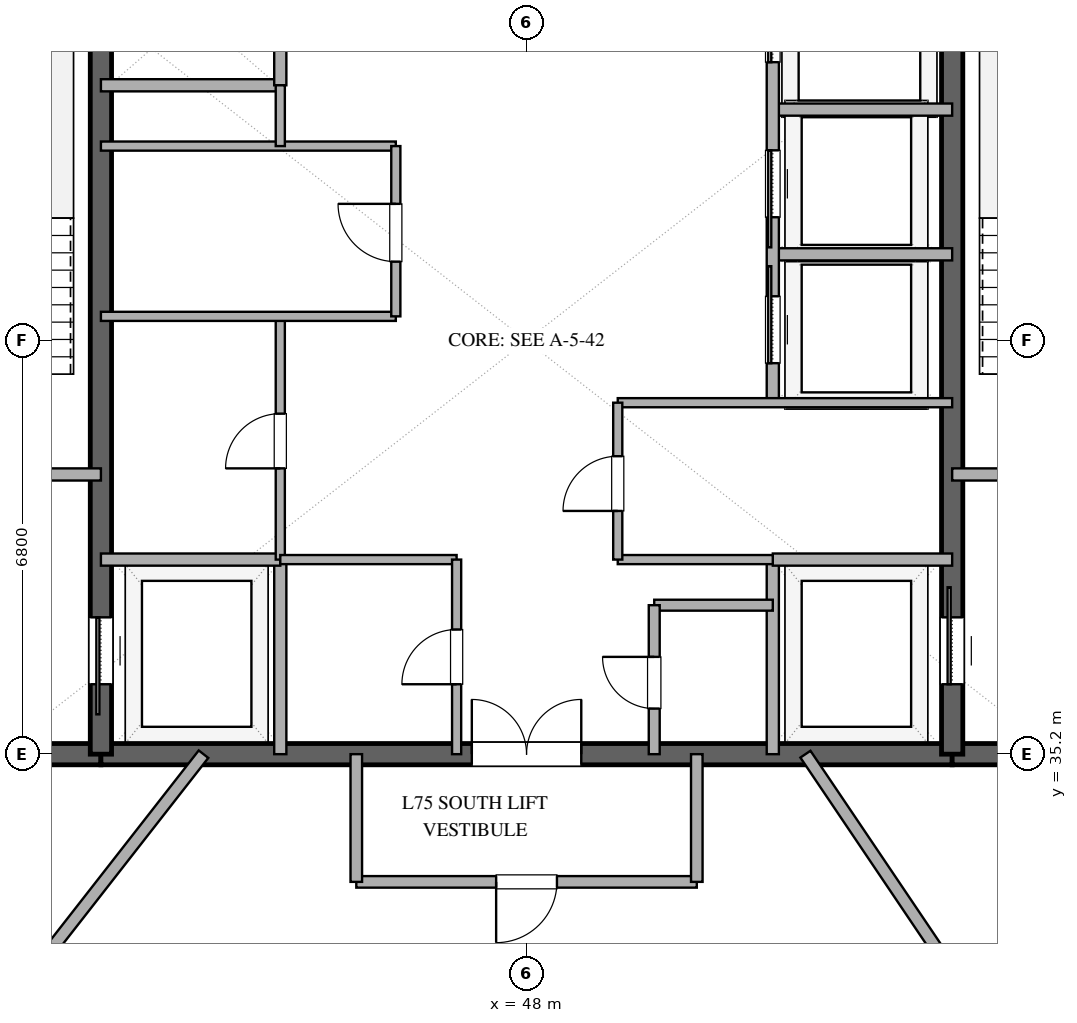
"""IFC4 building model, lengths in metres.
Left out: names, types, materials, properties, quantities, classifications, styles, units other than length and angle.
Written with IfcOpenShell. Run it as: python <this file> out.ifc"""

import sys

from ifc_helpers import new_model, si_unit, direction, frame, frame_2d, origin, place, context, subcontext, project, spatial, rectangle, extrude, element, fill, save


model = new_model("IFC4")
c1 = context("Model", 3, precision=1e-05, world=origin(), true_north=direction((0.0, 1.0)))
c2 = subcontext(c1, "Body", "Model", "MODEL_VIEW")
j1 = project(units=[si_unit("LENGTHUNIT", "METRE"), si_unit("PLANEANGLEUNIT", "RADIAN")], contexts=[c1])
p1 = place(None, origin())
s1 = spatial("IfcSite", under=j1, at=p1, CompositionType="ELEMENT")
p2 = place(p1, origin())
s2 = spatial("IfcBuilding", under=s1, at=p2, CompositionType="ELEMENT")
p3 = place(p2, frame((0.0, 0.0, 291.0)))
s3 = spatial("IfcBuildingStorey", under=s2, at=p3, CompositionType="ELEMENT", Elevation=291.0)
p4 = place(p3, frame((37.0, 35.2, 0.0), z_axis=(0.0, 0.0, 1.0), x_axis=(1.0, 0.0, 0.0)))
e1 = element("IfcWall", 1, at=p4, inside=s3, PredefinedType="SHEAR", context=c2, shape_type="SweptSolid", body=[
    extrude(rectangle(XDim=4.0, YDim=0.35, at=frame_2d((2.0, 0.0))), origin(), (0.0, 0.0, 1.0), 3.37),
])
p5 = place(p3, frame((41.0, 35.2, 0.0), z_axis=(0.0, 0.0, 1.0), x_axis=(1.0, 0.0, 0.0)))
e2 = element("IfcWall", 2, at=p5, inside=s3, PredefinedType="SHEAR", context=c2, shape_type="SweptSolid", body=[
    extrude(rectangle(XDim=14.0, YDim=0.35, at=frame_2d((7.0, 0.0))), origin(), (0.0, 0.0, 1.0), 3.37),
])
p6 = place(p5, frame((6.1, 0.0, 0.0)))
e3 = element("IfcOpeningElement", 3, at=p6, cuts=e2, PredefinedType="OPENING", context=c2, shape_type="SweptSolid", body=[
    extrude(rectangle(XDim=1.8, YDim=2.25, at=frame_2d((0.9, 1.125))), frame((0.0, 0.185, 0.0), z_axis=(0.0, -1.0, 0.0), x_axis=(1.0, 0.0, 0.0)), (0.0, 0.0, 1.0), 0.37),
])
p7 = place(p3, frame((55.0, 35.2, 0.0), z_axis=(0.0, 0.0, 1.0), x_axis=(1.0, 0.0, 0.0)))
e4 = element("IfcWall", 4, at=p7, inside=s3, PredefinedType="SHEAR", context=c2, shape_type="SweptSolid", body=[
    extrude(rectangle(XDim=4.0, YDim=0.35, at=frame_2d((2.0, 0.0))), origin(), (0.0, 0.0, 1.0), 3.37),
])
p8 = place(p3, frame((41.0, 35.2, 0.0), z_axis=(0.0, 0.0, 1.0), x_axis=(0.0, 1.0, 0.0)))
e5 = element("IfcWall", 5, at=p8, inside=s3, PredefinedType="SHEAR", context=c2, shape_type="SweptSolid", body=[
    extrude(rectangle(XDim=13.6, YDim=0.35, at=frame_2d((6.8, 0.0))), origin(), (0.0, 0.0, 1.0), 3.37),
])
p9 = place(p8, frame((1.15, 0.0, 0.0)))
e6 = element("IfcOpeningElement", 6, at=p9, cuts=e5, PredefinedType="OPENING", context=c2, shape_type="SweptSolid", body=[
    extrude(rectangle(XDim=1.1, YDim=2.2, at=frame_2d((0.55, 1.1))), frame((0.0, 0.185, 0.0), z_axis=(0.0, -1.0, 0.0), x_axis=(1.0, 0.0, 0.0)), (0.0, 0.0, 1.0), 0.37),
])
p10 = place(p3, frame((55.0, 35.2, 0.0), z_axis=(0.0, 0.0, 1.0), x_axis=(0.0, 1.0, 0.0)))
e7 = element("IfcWall", 7, at=p10, inside=s3, PredefinedType="SHEAR", context=c2, shape_type="SweptSolid", body=[
    extrude(rectangle(XDim=13.6, YDim=0.35, at=frame_2d((6.8, 0.0))), origin(), (0.0, 0.0, 1.0), 3.37),
])
p11 = place(p10, frame((1.15, 0.0, 0.0)))
e8 = element("IfcOpeningElement", 8, at=p11, cuts=e7, PredefinedType="OPENING", context=c2, shape_type="SweptSolid", body=[
    extrude(rectangle(XDim=1.1, YDim=2.2, at=frame_2d((0.55, 1.1))), frame((0.0, 0.185, 0.0), z_axis=(0.0, -1.0, 0.0), x_axis=(1.0, 0.0, 0.0)), (0.0, 0.0, 1.0), 0.37),
])
p12 = place(p3, frame((37.0, 39.8, 0.0), z_axis=(0.0, 0.0, 1.0), x_axis=(1.0, 0.0, 0.0)))
e9 = element("IfcWall", 9, at=p12, inside=s3, PredefinedType="SOLIDWALL", context=c2, shape_type="SweptSolid", body=[
    extrude(rectangle(XDim=4.0, YDim=0.2, at=frame_2d((2.0, 0.0))), origin(), (0.0, 0.0, 1.0), 2.73),
])
p13 = place(p12, frame((1.45, 0.0, 0.0)))
e10 = element("IfcOpeningElement", 10, at=p13, cuts=e9, PredefinedType="OPENING", context=c2, shape_type="SweptSolid", body=[
    extrude(rectangle(XDim=1.1, YDim=2.15, at=frame_2d((0.55, 1.075))), frame((0.0, 0.11, 0.0), z_axis=(0.0, -1.0, 0.0), x_axis=(1.0, 0.0, 0.0)), (0.0, 0.0, 1.0), 0.22),
])
p14 = place(p3, frame((55.0, 39.8, 0.0), z_axis=(0.0, 0.0, 1.0), x_axis=(1.0, 0.0, 0.0)))
e11 = element("IfcWall", 11, at=p14, inside=s3, PredefinedType="SOLIDWALL", context=c2, shape_type="SweptSolid", body=[
    extrude(rectangle(XDim=4.0, YDim=0.2, at=frame_2d((2.0, 0.0))), origin(), (0.0, 0.0, 1.0), 2.73),
])
p15 = place(p14, frame((1.45, 0.0, 0.0)))
e12 = element("IfcOpeningElement", 12, at=p15, cuts=e11, PredefinedType="OPENING", context=c2, shape_type="SweptSolid", body=[
    extrude(rectangle(XDim=1.1, YDim=2.15, at=frame_2d((0.55, 1.075))), frame((0.0, 0.11, 0.0), z_axis=(0.0, -1.0, 0.0), x_axis=(1.0, 0.0, 0.0)), (0.0, 0.0, 1.0), 0.22),
])
p16 = place(p3, frame((43.95, 35.2, 0.0), z_axis=(0.0, 0.0, 1.0), x_axis=(0.0, 1.0, 0.0)))
e13 = element("IfcWall", 13, at=p16, inside=s3, PredefinedType="SOLIDWALL", context=c2, shape_type="SweptSolid", body=[
    extrude(rectangle(XDim=3.2, YDim=0.2, at=frame_2d((1.6, 0.0))), origin(), (0.0, 0.0, 1.0), 2.73),
])
p17 = place(p3, frame((41.0, 38.4, 0.0), z_axis=(0.0, 0.0, 1.0), x_axis=(1.0, 0.0, 0.0)))
e14 = element("IfcWall", 14, at=p17, inside=s3, PredefinedType="SOLIDWALL", context=c2, shape_type="SweptSolid", body=[
    extrude(rectangle(XDim=2.95, YDim=0.2, at=frame_2d((1.475, 0.0))), origin(), (0.0, 0.0, 1.0), 2.73),
])
p18 = place(p3, frame((52.05, 35.2, 0.0), z_axis=(0.0, 0.0, 1.0), x_axis=(0.0, 1.0, 0.0)))
e15 = element("IfcWall", 15, at=p18, inside=s3, PredefinedType="SOLIDWALL", context=c2, shape_type="SweptSolid", body=[
    extrude(rectangle(XDim=3.2, YDim=0.2, at=frame_2d((1.6, 0.0))), origin(), (0.0, 0.0, 1.0), 2.73),
])
for number, where, z_axis, x_axis in (
    (16, (52.05, 38.4, 0.0), (0.0, 0.0, 1.0), (1.0, 0.0, 0.0)),
    (17, (41.0, 46.2, 0.0), (0.0, 0.0, 1.0), (1.0, 0.0, 0.0)),
):
    element("IfcWall", number, at=place(p3, frame(where, z_axis=z_axis, x_axis=x_axis)), inside=s3, PredefinedType="SOLIDWALL", context=c2, shape_type="SweptSolid", body=[
        extrude(rectangle(XDim=2.95, YDim=0.2, at=frame_2d((1.475, 0.0))), origin(), (0.0, 0.0, 1.0), 2.73),
    ])
p19 = place(p3, frame((43.95, 46.2, 0.0), z_axis=(0.0, 0.0, 1.0), x_axis=(0.0, 1.0, 0.0)))
e18 = element("IfcWall", 18, at=p19, inside=s3, PredefinedType="SOLIDWALL", context=c2, shape_type="SweptSolid", body=[
    extrude(rectangle(XDim=2.6, YDim=0.2, at=frame_2d((1.3, 0.0))), origin(), (0.0, 0.0, 1.0), 2.73),
])
p20 = place(p19, frame((0.8, 0.0, 0.0)))
e19 = element("IfcOpeningElement", 19, at=p20, cuts=e18, PredefinedType="OPENING", context=c2, shape_type="SweptSolid", body=[
    extrude(rectangle(XDim=0.85, YDim=2.15, at=frame_2d((0.425, 1.075))), frame((0.0, 0.11, 0.0), z_axis=(0.0, -1.0, 0.0), x_axis=(1.0, 0.0, 0.0)), (0.0, 0.0, 1.0), 0.22),
])
p21 = place(p3, frame((43.95, 38.4, 0.0), z_axis=(0.0, 0.0, 1.0), x_axis=(0.0, 1.0, 0.0)))
e20 = element("IfcWall", 20, at=p21, inside=s3, PredefinedType="PARTITIONING", context=c2, shape_type="SweptSolid", body=[
    extrude(rectangle(XDim=4.0, YDim=0.15, at=frame_2d((2.0, 0.0))), origin(), (0.0, 0.0, 1.0), 2.73),
])
p22 = place(p21, frame((1.5, 0.0, 0.0)))
e21 = element("IfcOpeningElement", 21, at=p22, cuts=e20, PredefinedType="OPENING", context=c2, shape_type="SweptSolid", body=[
    extrude(rectangle(XDim=0.9, YDim=2.15, at=frame_2d((0.45, 1.075))), frame((0.0, 0.085, 0.0), z_axis=(0.0, -1.0, 0.0), x_axis=(1.0, 0.0, 0.0)), (0.0, 0.0, 1.0), 0.17),
])
for number, where, z_axis, x_axis in (
    (22, (41.0, 42.4, 0.0), (0.0, 0.0, 1.0), (1.0, 0.0, 0.0)),
    (23, (41.0, 45.2, 0.0), (0.0, 0.0, 1.0), (1.0, 0.0, 0.0)),
):
    element("IfcWall", number, at=place(p3, frame(where, z_axis=z_axis, x_axis=x_axis)), inside=s3, PredefinedType="PARTITIONING", context=c2, shape_type="SweptSolid", body=[
        extrude(rectangle(XDim=4.85, YDim=0.15, at=frame_2d((2.425, 0.0))), origin(), (0.0, 0.0, 1.0), 2.73),
    ])
p23 = place(p3, frame((43.95, 45.2, 0.0), z_axis=(0.0, 0.0, 1.0), x_axis=(0.0, 1.0, 0.0)))
e24 = element("IfcWall", 24, at=p23, inside=s3, PredefinedType="PARTITIONING", context=c2, shape_type="SweptSolid", body=[
    extrude(rectangle(XDim=1.0, YDim=0.15, at=frame_2d((0.5, 0.0))), origin(), (0.0, 0.0, 1.0), 2.73),
])
p24 = place(p3, frame((45.85, 42.4, 0.0), z_axis=(0.0, 0.0, 1.0), x_axis=(0.0, 1.0, 0.0)))
e25 = element("IfcWall", 25, at=p24, inside=s3, PredefinedType="PARTITIONING", context=c2, shape_type="SweptSolid", body=[
    extrude(rectangle(XDim=2.8, YDim=0.15, at=frame_2d((1.4, 0.0))), origin(), (0.0, 0.0, 1.0), 2.73),
])
p25 = place(p24, frame((0.9, 0.0, 0.0)))
e26 = element("IfcOpeningElement", 26, at=p25, cuts=e25, PredefinedType="OPENING", context=c2, shape_type="SweptSolid", body=[
    extrude(rectangle(XDim=0.95, YDim=2.15, at=frame_2d((0.475, 1.075))), frame((0.0, 0.085, 0.0), z_axis=(0.0, -1.0, 0.0), x_axis=(1.0, 0.0, 0.0)), (0.0, 0.0, 1.0), 0.17),
])
for number, where, z_axis, x_axis in (
    (27, (52.05, 43.42, 0.0), (0.0, 0.0, 1.0), (1.0, 0.0, 0.0)),
    (28, (52.05, 45.8, 0.0), (0.0, 0.0, 1.0), (1.0, 0.0, 0.0)),
):
    element("IfcWall", number, at=place(p3, frame(where, z_axis=z_axis, x_axis=x_axis)), inside=s3, PredefinedType="SOLIDWALL", context=c2, shape_type="SweptSolid", body=[
        extrude(rectangle(XDim=2.95, YDim=0.2, at=frame_2d((1.475, 0.0))), origin(), (0.0, 0.0, 1.0), 2.73),
    ])
p26 = place(p3, frame((52.05, 40.98, 0.0), z_axis=(0.0, 0.0, 1.0), x_axis=(0.0, 1.0, 0.0)))
e29 = element("IfcWall", 29, at=p26, inside=s3, PredefinedType="SOLIDWALL", context=c2, shape_type="SweptSolid", body=[
    extrude(rectangle(XDim=7.82, YDim=0.2, at=frame_2d((3.91, 0.0))), origin(), (0.0, 0.0, 1.0), 2.73),
])
p27 = place(p26, frame((0.65, 0.0, 0.0)))
e30 = element("IfcOpeningElement", 30, at=p27, cuts=e29, PredefinedType="OPENING", context=c2, shape_type="SweptSolid", body=[
    extrude(rectangle(XDim=1.1, YDim=2.2, at=frame_2d((0.55, 1.1))), frame((0.0, 0.11, 0.0), z_axis=(0.0, -1.0, 0.0), x_axis=(1.0, 0.0, 0.0)), (0.0, 0.0, 1.0), 0.22),
])
p28 = place(p26, frame((3.05, 0.0, 0.0)))
e31 = element("IfcOpeningElement", 31, at=p28, cuts=e29, PredefinedType="OPENING", context=c2, shape_type="SweptSolid", body=[
    extrude(rectangle(XDim=1.1, YDim=2.2, at=frame_2d((0.55, 1.1))), frame((0.0, 0.11, 0.0), z_axis=(0.0, -1.0, 0.0), x_axis=(1.0, 0.0, 0.0)), (0.0, 0.0, 1.0), 0.22),
])
p29 = place(p26, frame((5.6, 0.0, 0.0)))
e32 = element("IfcOpeningElement", 32, at=p29, cuts=e29, PredefinedType="OPENING", context=c2, shape_type="SweptSolid", body=[
    extrude(rectangle(XDim=1.2, YDim=2.2, at=frame_2d((0.6, 1.1))), frame((0.0, 0.11, 0.0), z_axis=(0.0, -1.0, 0.0), x_axis=(1.0, 0.0, 0.0)), (0.0, 0.0, 1.0), 0.22),
])
p30 = place(p3, frame((49.5, 40.98, 0.0), z_axis=(0.0, 0.0, 1.0), x_axis=(1.0, 0.0, 0.0)))
e33 = element("IfcWall", 33, at=p30, inside=s3, PredefinedType="PARTITIONING", context=c2, shape_type="SweptSolid", body=[
    extrude(rectangle(XDim=5.5, YDim=0.15, at=frame_2d((2.75, 0.0))), origin(), (0.0, 0.0, 1.0), 2.73),
])
p31 = place(p3, frame((49.5, 38.4, 0.0), z_axis=(0.0, 0.0, 1.0), x_axis=(1.0, 0.0, 0.0)))
e34 = element("IfcWall", 34, at=p31, inside=s3, PredefinedType="PARTITIONING", context=c2, shape_type="SweptSolid", body=[
    extrude(rectangle(XDim=2.55, YDim=0.15, at=frame_2d((1.275, 0.0))), origin(), (0.0, 0.0, 1.0), 2.73),
])
p32 = place(p3, frame((49.5, 38.4, 0.0), z_axis=(0.0, 0.0, 1.0), x_axis=(0.0, 1.0, 0.0)))
e35 = element("IfcWall", 35, at=p32, inside=s3, PredefinedType="PARTITIONING", context=c2, shape_type="SweptSolid", body=[
    extrude(rectangle(XDim=2.58, YDim=0.15, at=frame_2d((1.29, 0.0))), origin(), (0.0, 0.0, 1.0), 2.73),
])
p33 = place(p32, frame((0.8, 0.0, 0.0)))
e36 = element("IfcOpeningElement", 36, at=p33, cuts=e35, PredefinedType="OPENING", context=c2, shape_type="SweptSolid", body=[
    extrude(rectangle(XDim=0.9, YDim=2.15, at=frame_2d((0.45, 1.075))), frame((0.0, 0.085, 0.0), z_axis=(0.0, -1.0, 0.0), x_axis=(1.0, 0.0, 0.0)), (0.0, 0.0, 1.0), 0.17),
])
p34 = place(p3, frame((43.95, 38.4, 0.0), z_axis=(0.0, 0.0, 1.0), x_axis=(1.0, 0.0, 0.0)))
e37 = element("IfcWall", 37, at=p34, inside=s3, PredefinedType="PARTITIONING", context=c2, shape_type="SweptSolid", body=[
    extrude(rectangle(XDim=2.9, YDim=0.15, at=frame_2d((1.45, 0.0))), origin(), (0.0, 0.0, 1.0), 2.73),
])
p35 = place(p3, frame((46.85, 35.2, 0.0), z_axis=(0.0, 0.0, 1.0), x_axis=(0.0, 1.0, 0.0)))
e38 = element("IfcWall", 38, at=p35, inside=s3, PredefinedType="PARTITIONING", context=c2, shape_type="SweptSolid", body=[
    extrude(rectangle(XDim=3.2, YDim=0.15, at=frame_2d((1.6, 0.0))), origin(), (0.0, 0.0, 1.0), 2.73),
])
p36 = place(p35, frame((1.15, 0.0, 0.0)))
e39 = element("IfcOpeningElement", 39, at=p36, cuts=e38, PredefinedType="OPENING", context=c2, shape_type="SweptSolid", body=[
    extrude(rectangle(XDim=0.9, YDim=2.15, at=frame_2d((0.45, 1.075))), frame((0.0, 0.085, 0.0), z_axis=(0.0, -1.0, 0.0), x_axis=(1.0, 0.0, 0.0)), (0.0, 0.0, 1.0), 0.17),
])
p37 = place(p3, frame((50.1, 37.65, 0.0), z_axis=(0.0, 0.0, 1.0), x_axis=(1.0, 0.0, 0.0)))
e40 = element("IfcWall", 40, at=p37, inside=s3, PredefinedType="PLUMBINGWALL", context=c2, shape_type="SweptSolid", body=[
    extrude(rectangle(XDim=1.95, YDim=0.18, at=frame_2d((0.975, 0.0))), origin(), (0.0, 0.0, 1.0), 2.73),
])
p38 = place(p3, frame((50.1, 35.2, 0.0), z_axis=(0.0, 0.0, 1.0), x_axis=(0.0, 1.0, 0.0)))
e41 = element("IfcWall", 41, at=p38, inside=s3, PredefinedType="PLUMBINGWALL", context=c2, shape_type="SweptSolid", body=[
    extrude(rectangle(XDim=2.45, YDim=0.18, at=frame_2d((1.225, 0.0))), origin(), (0.0, 0.0, 1.0), 2.73),
])
p39 = place(p38, frame((0.75, 0.0, 0.0)))
e42 = element("IfcOpeningElement", 42, at=p39, cuts=e41, PredefinedType="OPENING", context=c2, shape_type="SweptSolid", body=[
    extrude(rectangle(XDim=0.85, YDim=2.1, at=frame_2d((0.425, 1.05))), frame((0.0, 0.1, 0.0), z_axis=(0.0, -1.0, 0.0), x_axis=(1.0, 0.0, 0.0)), (0.0, 0.0, 1.0), 0.2),
])
p40 = place(p3, frame((42.687, 35.2, 0.0), z_axis=(0.0, 0.0, 1.0), x_axis=(-0.615663811723, -0.788008928208, 0.0)))
e43 = element("IfcWall", 43, at=p40, inside=s3, PredefinedType="PARTITIONING", context=c2, shape_type="SweptSolid", body=[
    extrude(rectangle(XDim=12.701, YDim=0.2, at=frame_2d((6.351, 0.0))), origin(), (0.0, 0.0, 1.0), 2.73),
])
p41 = place(p3, frame((50.8, 33.1, 0.0), z_axis=(0.0, 0.0, 1.0), x_axis=(-1.0, 0.0, 0.0)))
e44 = element("IfcWall", 44, at=p41, inside=s3, PredefinedType="PARTITIONING", context=c2, shape_type="SweptSolid", body=[
    extrude(rectangle(XDim=5.6, YDim=0.19, at=frame_2d((2.8, 0.0))), origin(), (0.0, 0.0, 1.0), 2.73),
])
p42 = place(p41, frame((2.3, 0.0, 0.0)))
e45 = element("IfcOpeningElement", 45, at=p42, cuts=e44, PredefinedType="OPENING", context=c2, shape_type="SweptSolid", body=[
    extrude(rectangle(XDim=1.0, YDim=2.2, at=frame_2d((0.5, 1.1))), frame((0.0, 0.105, 0.0), z_axis=(0.0, -1.0, 0.0), x_axis=(1.0, 0.0, 0.0)), (0.0, 0.0, 1.0), 0.21),
])
p43 = place(p3, frame((54.97, 31.667, 0.0), z_axis=(0.0, 0.0, 1.0), x_axis=(-0.559200276542, 0.829032599308, 0.0)))
e46 = element("IfcWall", 46, at=p43, inside=s3, PredefinedType="PARTITIONING", context=c2, shape_type="SweptSolid", body=[
    extrude(rectangle(XDim=4.261, YDim=0.2, at=frame_2d((2.131, 0.0))), origin(), (0.0, 0.0, 1.0), 2.73),
])
for number, where, z_axis, x_axis in (
    (47, (50.8, 35.2, 0.0), (0.0, 0.0, 1.0), (0.0, -1.0, 0.0)),
    (48, (45.2, 33.1, 0.0), (0.0, 0.0, 1.0), (0.0, 1.0, 0.0)),
):
    element("IfcWall", number, at=place(p3, frame(where, z_axis=z_axis, x_axis=x_axis)), inside=s3, PredefinedType="PARTITIONING", context=c2, shape_type="SweptSolid", body=[
        extrude(rectangle(XDim=2.1, YDim=0.19, at=frame_2d((1.05, 0.0))), origin(), (0.0, 0.0, 1.0), 2.73),
    ])
p44 = place(p9, origin())
e49 = element("IfcDoor", 49, at=p44, inside=s3, OperationType="SLIDING_TO_LEFT", PredefinedType="DOOR", context=c2, shape_type="SweptSolid", body=[
    extrude(rectangle(XDim=1.1, YDim=2.2, at=frame_2d((0.55, 1.1))), frame((0.0, 0.025, 0.0), z_axis=(0.0, -1.0, 0.0), x_axis=(1.0, 0.0, 0.0)), (0.0, 0.0, 1.0), 0.05),
])
fill(e6, e49)
p45 = place(p11, origin())
e50 = element("IfcDoor", 50, at=p45, inside=s3, OperationType="SLIDING_TO_RIGHT", PredefinedType="DOOR", context=c2, shape_type="SweptSolid", body=[
    extrude(rectangle(XDim=1.1, YDim=2.2, at=frame_2d((0.55, 1.1))), frame((0.0, 0.025, 0.0), z_axis=(0.0, -1.0, 0.0), x_axis=(1.0, 0.0, 0.0)), (0.0, 0.0, 1.0), 0.05),
])
fill(e8, e50)
p46 = place(p6, origin())
e51 = element("IfcDoor", 51, at=p46, inside=s3, OperationType="DOUBLE_DOOR_SINGLE_SWING", PredefinedType="DOOR", context=c2, shape_type="SweptSolid", body=[
    extrude(rectangle(XDim=1.8, YDim=2.25, at=frame_2d((0.9, 1.125))), frame((0.0, 0.025, 0.0), z_axis=(0.0, -1.0, 0.0), x_axis=(1.0, 0.0, 0.0)), (0.0, 0.0, 1.0), 0.05),
])
fill(e3, e51)
p47 = place(p22, origin())
e52 = element("IfcDoor", 52, at=p47, inside=s3, OperationType="SINGLE_SWING_LEFT", PredefinedType="DOOR", context=c2, shape_type="SweptSolid", body=[
    extrude(rectangle(XDim=0.9, YDim=2.15, at=frame_2d((0.45, 1.075))), frame((0.0, 0.025, 0.0), z_axis=(0.0, -1.0, 0.0), x_axis=(1.0, 0.0, 0.0)), (0.0, 0.0, 1.0), 0.05),
])
fill(e21, e52)
p48 = place(p25, origin())
e53 = element("IfcDoor", 53, at=p48, inside=s3, OperationType="SINGLE_SWING_RIGHT", PredefinedType="DOOR", context=c2, shape_type="SweptSolid", body=[
    extrude(rectangle(XDim=0.95, YDim=2.15, at=frame_2d((0.475, 1.075))), frame((0.0, 0.025, 0.0), z_axis=(0.0, -1.0, 0.0), x_axis=(1.0, 0.0, 0.0)), (0.0, 0.0, 1.0), 0.05),
])
fill(e26, e53)
p49 = place(p27, origin())
e54 = element("IfcDoor", 54, at=p49, inside=s3, OperationType="SLIDING_TO_RIGHT", PredefinedType="DOOR", context=c2, shape_type="SweptSolid", body=[
    extrude(rectangle(XDim=1.1, YDim=2.2, at=frame_2d((0.55, 1.1))), frame((0.0, 0.025, 0.0), z_axis=(0.0, -1.0, 0.0), x_axis=(1.0, 0.0, 0.0)), (0.0, 0.0, 1.0), 0.05),
])
fill(e30, e54)
p50 = place(p28, origin())
e55 = element("IfcDoor", 55, at=p50, inside=s3, OperationType="SLIDING_TO_LEFT", PredefinedType="DOOR", context=c2, shape_type="SweptSolid", body=[
    extrude(rectangle(XDim=1.1, YDim=2.2, at=frame_2d((0.55, 1.1))), frame((0.0, 0.025, 0.0), z_axis=(0.0, -1.0, 0.0), x_axis=(1.0, 0.0, 0.0)), (0.0, 0.0, 1.0), 0.05),
])
fill(e31, e55)
p51 = place(p29, origin())
e56 = element("IfcDoor", 56, at=p51, inside=s3, OperationType="SLIDING_TO_RIGHT", PredefinedType="DOOR", context=c2, shape_type="SweptSolid", body=[
    extrude(rectangle(XDim=1.2, YDim=2.2, at=frame_2d((0.6, 1.1))), frame((0.0, 0.025, 0.0), z_axis=(0.0, -1.0, 0.0), x_axis=(1.0, 0.0, 0.0)), (0.0, 0.0, 1.0), 0.05),
])
fill(e32, e56)
p52 = place(p33, origin())
e57 = element("IfcDoor", 57, at=p52, inside=s3, OperationType="SINGLE_SWING_LEFT", PredefinedType="DOOR", context=c2, shape_type="SweptSolid", body=[
    extrude(rectangle(XDim=0.9, YDim=2.15, at=frame_2d((0.45, 1.075))), frame((0.0, 0.025, 0.0), z_axis=(0.0, -1.0, 0.0), x_axis=(1.0, 0.0, 0.0)), (0.0, 0.0, 1.0), 0.05),
])
fill(e36, e57)
p53 = place(p36, origin())
e58 = element("IfcDoor", 58, at=p53, inside=s3, OperationType="SINGLE_SWING_LEFT", PredefinedType="DOOR", context=c2, shape_type="SweptSolid", body=[
    extrude(rectangle(XDim=0.9, YDim=2.15, at=frame_2d((0.45, 1.075))), frame((0.0, 0.025, 0.0), z_axis=(0.0, -1.0, 0.0), x_axis=(1.0, 0.0, 0.0)), (0.0, 0.0, 1.0), 0.05),
])
fill(e39, e58)
p54 = place(p39, origin())
e59 = element("IfcDoor", 59, at=p54, inside=s3, OperationType="SINGLE_SWING_RIGHT", PredefinedType="DOOR", context=c2, shape_type="SweptSolid", body=[
    extrude(rectangle(XDim=0.85, YDim=2.1, at=frame_2d((0.425, 1.05))), frame((0.0, 0.025, 0.0), z_axis=(0.0, -1.0, 0.0), x_axis=(1.0, 0.0, 0.0)), (0.0, 0.0, 1.0), 0.05),
])
fill(e42, e59)
p55 = place(p42, origin())
e60 = element("IfcDoor", 60, at=p55, inside=s3, OperationType="SINGLE_SWING_RIGHT", PredefinedType="DOOR", context=c2, shape_type="SweptSolid", body=[
    extrude(rectangle(XDim=1.0, YDim=2.2, at=frame_2d((0.5, 1.1))), frame((0.0, 0.025, 0.0), z_axis=(0.0, -1.0, 0.0), x_axis=(1.0, 0.0, 0.0)), (0.0, 0.0, 1.0), 0.05),
])
fill(e45, e60)
save(model, sys.argv[1])
